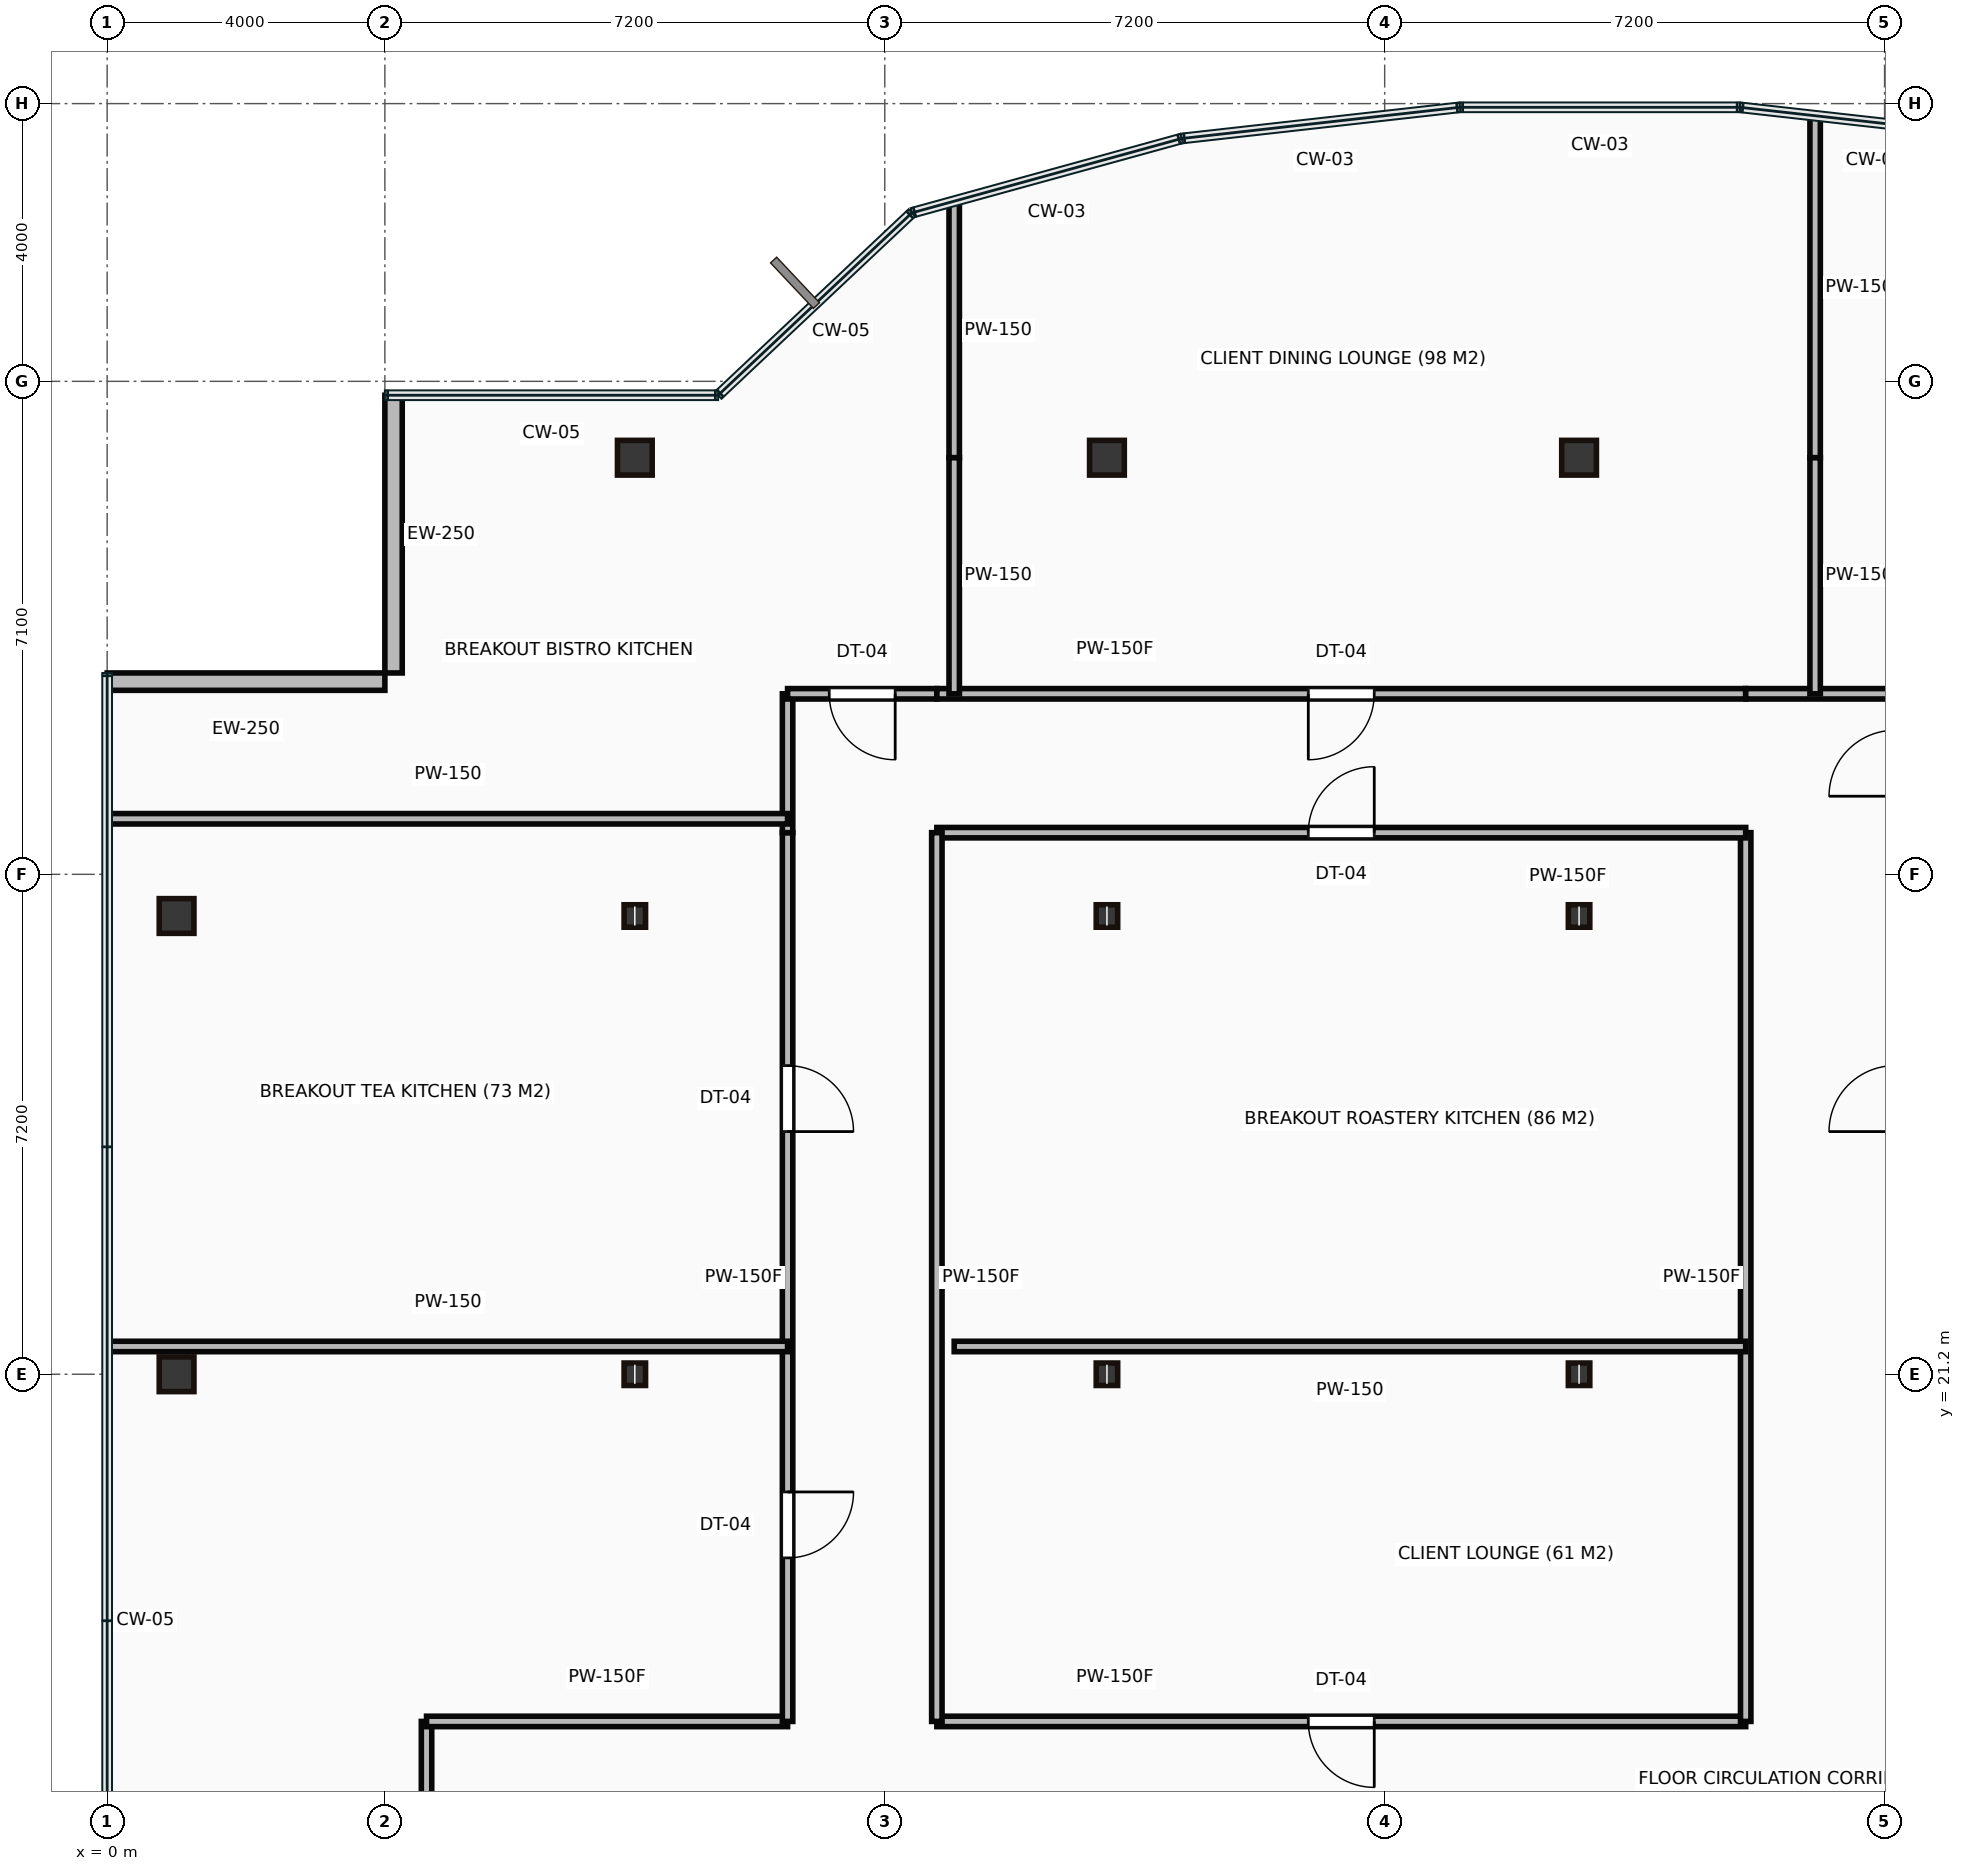
"""IFC4 building model, lengths in metres.
Left out: names, types, materials, properties, quantities, classifications, styles, units other than length and angle.
Written with IfcOpenShell. Run it as: python <this file> out.ifc"""

import sys

from ifc_helpers import new_model, si_unit, direction, frame, frame_2d, origin, origin_2d, place, context, subcontext, project, spatial, rectangle, hollow_rectangle, i_section, extrude, source, transform, mapped, element, fill, save


model = new_model("IFC4")
c1 = context("Model", 3, precision=1e-05, world=origin(), true_north=direction((0.0, 1.0)))
c2 = subcontext(c1, "Body", "Model", "MODEL_VIEW")
j1 = project(units=[si_unit("LENGTHUNIT", "METRE"), si_unit("PLANEANGLEUNIT", "RADIAN")], contexts=[c1])
p1 = place(None, origin())
s1 = spatial("IfcSite", under=j1, at=p1, CompositionType="ELEMENT")
p2 = place(p1, origin())
s2 = spatial("IfcBuilding", under=s1, at=p2, CompositionType="ELEMENT")
p3 = place(p2, frame((0.0, 0.0, 255.15)))
s3 = spatial("IfcBuildingStorey", under=s2, at=p3, CompositionType="ELEMENT", Elevation=255.15)
m1 = source(origin(), c2, "Body", "SweptSolid", [
    extrude(hollow_rectangle(XDim=0.5, YDim=0.5, WallThickness=0.022, at=origin_2d()), origin(), (0.0, 0.0, 1.0), 3.65),
])
for number, where, z_axis, x_axis in (
    (1, (1.0, 21.2, 0.0), (0.0, 0.0, 1.0), (1.0, 0.0, 0.0)),
    (2, (1.0, 27.8, 0.0), (0.0, 0.0, 1.0), (1.0, 0.0, 0.0)),
):
    element("IfcColumn", number, at=place(p3, frame(where, z_axis=z_axis, x_axis=x_axis)), inside=s3, PredefinedType="COLUMN", context=c2, shape_type="MappedRepresentation", body=[
        mapped(m1, transform((0.0, 0.0, 0.0))),
    ])
m2 = source(origin(), c2, "Body", "SweptSolid", [
    extrude(i_section(OverallWidth=0.309, OverallDepth=0.323, WebThickness=0.014, FlangeThickness=0.023, at=origin_2d()), origin(), (0.0, 0.0, 1.0), 3.65),
])
for number, where, z_axis, x_axis in (
    (3, (7.6, 21.2, 0.0), (0.0, 0.0, 1.0), (1.0, 0.0, 0.0)),
    (4, (7.6, 27.8, 0.0), (0.0, 0.0, 1.0), (1.0, 0.0, 0.0)),
):
    element("IfcColumn", number, at=place(p3, frame(where, z_axis=z_axis, x_axis=x_axis)), inside=s3, PredefinedType="COLUMN", context=c2, shape_type="MappedRepresentation", body=[
        mapped(m2, transform((0.0, 0.0, 0.0))),
    ])
p4 = place(p3, frame((7.6, 34.4, 0.0), z_axis=(0.0, 0.0, 1.0), x_axis=(1.0, 0.0, 0.0)))
e5 = element("IfcColumn", 5, at=p4, inside=s3, PredefinedType="COLUMN", context=c2, shape_type="MappedRepresentation", body=[
    mapped(m1, transform((0.0, 0.0, 0.0))),
])
for number, where, z_axis, x_axis in (
    (6, (14.4, 21.2, 0.0), (0.0, 0.0, 1.0), (1.0, 0.0, 0.0)),
    (7, (14.4, 27.8, 0.0), (0.0, 0.0, 1.0), (1.0, 0.0, 0.0)),
):
    element("IfcColumn", number, at=place(p3, frame(where, z_axis=z_axis, x_axis=x_axis)), inside=s3, PredefinedType="COLUMN", context=c2, shape_type="MappedRepresentation", body=[
        mapped(m2, transform((0.0, 0.0, 0.0))),
    ])
p5 = place(p3, frame((14.4, 34.4, 0.0), z_axis=(0.0, 0.0, 1.0), x_axis=(1.0, 0.0, 0.0)))
e8 = element("IfcColumn", 8, at=p5, inside=s3, PredefinedType="COLUMN", context=c2, shape_type="MappedRepresentation", body=[
    mapped(m1, transform((0.0, 0.0, 0.0))),
])
for number, where, z_axis, x_axis in (
    (9, (21.2, 21.2, 0.0), (0.0, 0.0, 1.0), (1.0, 0.0, 0.0)),
    (10, (21.2, 27.8, 0.0), (0.0, 0.0, 1.0), (1.0, 0.0, 0.0)),
):
    element("IfcColumn", number, at=place(p3, frame(where, z_axis=z_axis, x_axis=x_axis)), inside=s3, PredefinedType="COLUMN", context=c2, shape_type="MappedRepresentation", body=[
        mapped(m2, transform((0.0, 0.0, 0.0))),
    ])
p6 = place(p3, frame((21.2, 34.4, 0.0), z_axis=(0.0, 0.0, 1.0), x_axis=(1.0, 0.0, 0.0)))
e11 = element("IfcColumn", 11, at=p6, inside=s3, PredefinedType="COLUMN", context=c2, shape_type="MappedRepresentation", body=[
    mapped(m1, transform((0.0, 0.0, 0.0))),
])
m3 = source(origin(), c2, "Body", "SweptSolid", [
    extrude(rectangle(XDim=4.0, YDim=0.25, at=frame_2d((2.0, 0.0))), origin(), (0.0, 0.0, 1.0), 3.4),
])
for number, where, z_axis, x_axis in (
    (12, (4.125, 35.3, 0.0), (0.0, 0.0, 1.0), (0.0, -1.0, 0.0)),
    (13, (4.0, 31.175, 0.0), (0.0, 0.0, 1.0), (-1.0, 0.0, 0.0)),
):
    element("IfcWall", number, at=place(p3, frame(where, z_axis=z_axis, x_axis=x_axis)), inside=s3, PredefinedType="STANDARD", context=c2, shape_type="MappedRepresentation", body=[
        mapped(m3, transform((0.0, 0.0, 0.0))),
    ])
m4 = source(origin(), c2, "Body", "SweptSolid", [
    extrude(rectangle(XDim=2.12, YDim=0.15, at=frame_2d((1.06, 0.0))), origin(), (0.0, 0.0, 1.0), 3.4),
])
p7 = place(p3, frame((4.6, 14.08, 0.0), z_axis=(0.0, 0.0, 1.0), x_axis=(0.0, 1.0, 0.0)))
e14 = element("IfcWall", 14, at=p7, inside=s3, PredefinedType="PARTITIONING", context=c2, shape_type="MappedRepresentation", body=[
    mapped(m4, transform((0.0, 0.0, 0.0))),
])
m5 = source(origin(), c2, "Body", "SweptSolid", [
    extrude(rectangle(XDim=5.2, YDim=0.15, at=frame_2d((2.6, 0.0))), origin(), (0.0, 0.0, 1.0), 3.4),
])
p8 = place(p3, frame((4.6, 16.2, 0.0), z_axis=(0.0, 0.0, 1.0), x_axis=(1.0, 0.0, 0.0)))
e15 = element("IfcWall", 15, at=p8, inside=s3, PredefinedType="PARTITIONING", context=c2, shape_type="MappedRepresentation", body=[
    mapped(m5, transform((0.0, 0.0, 0.0))),
])
m6 = source(origin(), c2, "Body", "SweptSolid", [
    extrude(rectangle(XDim=12.8, YDim=0.15, at=frame_2d((6.4, 0.0))), origin(), (0.0, 0.0, 1.0), 3.4),
])
p9 = place(p3, frame((9.8, 16.2, 0.0), z_axis=(0.0, 0.0, 1.0), x_axis=(0.0, 1.0, 0.0)))
e16 = element("IfcWall", 16, at=p9, inside=s3, PredefinedType="PARTITIONING", context=c2, shape_type="MappedRepresentation", body=[
    mapped(m6, transform((0.0, 0.0, 0.0))),
])
p10 = place(p9, frame((2.355, 0.0, 0.0)))
e17 = element("IfcOpeningElement", 17, at=p10, cuts=e16, PredefinedType="OPENING", context=c2, shape_type="SweptSolid", body=[
    extrude(rectangle(XDim=0.95, YDim=2.15, at=frame_2d((0.475, 1.075))), frame((0.0, 0.085, 0.0), z_axis=(0.0, -1.0, 0.0), x_axis=(1.0, 0.0, 0.0)), (0.0, 0.0, 1.0), 0.17),
])
p11 = place(p9, frame((8.495, 0.0, 0.0)))
e18 = element("IfcOpeningElement", 18, at=p11, cuts=e16, PredefinedType="OPENING", context=c2, shape_type="SweptSolid", body=[
    extrude(rectangle(XDim=0.95, YDim=2.15, at=frame_2d((0.475, 1.075))), frame((0.0, 0.085, 0.0), z_axis=(0.0, -1.0, 0.0), x_axis=(1.0, 0.0, 0.0)), (0.0, 0.0, 1.0), 0.17),
])
m7 = source(origin(), c2, "Body", "SweptSolid", [
    extrude(rectangle(XDim=2.0, YDim=0.15, at=frame_2d((1.0, 0.0))), origin(), (0.0, 0.0, 1.0), 3.4),
])
p12 = place(p3, frame((9.8, 29.0, 0.0), z_axis=(0.0, 0.0, 1.0), x_axis=(0.0, 1.0, 0.0)))
e19 = element("IfcWall", 19, at=p12, inside=s3, PredefinedType="PARTITIONING", context=c2, shape_type="MappedRepresentation", body=[
    mapped(m7, transform((0.0, 0.0, 0.0))),
])
m8 = source(origin(), c2, "Body", "SweptSolid", [
    extrude(rectangle(XDim=2.15, YDim=0.15, at=frame_2d((1.075, 0.0))), origin(), (0.0, 0.0, 1.0), 3.4),
])
p13 = place(p3, frame((9.8, 31.0, 0.0), z_axis=(0.0, 0.0, 1.0), x_axis=(1.0, 0.0, 0.0)))
e20 = element("IfcWall", 20, at=p13, inside=s3, PredefinedType="PARTITIONING", context=c2, shape_type="MappedRepresentation", body=[
    mapped(m8, transform((0.0, 0.0, 0.0))),
])
p14 = place(p13, frame((0.6, 0.0, 0.0)))
e21 = element("IfcOpeningElement", 21, at=p14, cuts=e20, PredefinedType="OPENING", context=c2, shape_type="SweptSolid", body=[
    extrude(rectangle(XDim=0.95, YDim=2.15, at=frame_2d((0.475, 1.075))), frame((0.0, 0.085, 0.0), z_axis=(0.0, -1.0, 0.0), x_axis=(1.0, 0.0, 0.0)), (0.0, 0.0, 1.0), 0.17),
])
m9 = source(origin(), c2, "Body", "SweptSolid", [
    extrude(rectangle(XDim=11.65, YDim=0.15, at=frame_2d((5.825, 0.0))), origin(), (0.0, 0.0, 1.0), 3.4),
])
p15 = place(p3, frame((11.95, 31.0, 0.0), z_axis=(0.0, 0.0, 1.0), x_axis=(1.0, 0.0, 0.0)))
e22 = element("IfcWall", 22, at=p15, inside=s3, PredefinedType="PARTITIONING", context=c2, shape_type="MappedRepresentation", body=[
    mapped(m9, transform((0.0, 0.0, 0.0))),
])
p16 = place(p15, frame((5.35, 0.0, 0.0)))
e23 = element("IfcOpeningElement", 23, at=p16, cuts=e22, PredefinedType="OPENING", context=c2, shape_type="SweptSolid", body=[
    extrude(rectangle(XDim=0.95, YDim=2.15, at=frame_2d((0.475, 1.075))), frame((0.0, 0.085, 0.0), z_axis=(0.0, -1.0, 0.0), x_axis=(1.0, 0.0, 0.0)), (0.0, 0.0, 1.0), 0.17),
])
p17 = place(p3, frame((23.6, 31.0, 0.0), z_axis=(0.0, 0.0, 1.0), x_axis=(1.0, 0.0, 0.0)))
e24 = element("IfcWall", 24, at=p17, inside=s3, PredefinedType="PARTITIONING", context=c2, shape_type="MappedRepresentation", body=[
    mapped(m8, transform((0.0, 0.0, 0.0))),
])
p18 = place(p3, frame((11.95, 16.2, 0.0), z_axis=(0.0, 0.0, 1.0), x_axis=(1.0, 0.0, 0.0)))
e25 = element("IfcWall", 25, at=p18, inside=s3, PredefinedType="PARTITIONING", context=c2, shape_type="MappedRepresentation", body=[
    mapped(m9, transform((0.0, 0.0, 0.0))),
])
p19 = place(p18, frame((5.35, 0.0, 0.0)))
e26 = element("IfcOpeningElement", 26, at=p19, cuts=e25, PredefinedType="OPENING", context=c2, shape_type="SweptSolid", body=[
    extrude(rectangle(XDim=0.95, YDim=2.15, at=frame_2d((0.475, 1.075))), frame((0.0, 0.085, 0.0), z_axis=(0.0, -1.0, 0.0), x_axis=(1.0, 0.0, 0.0)), (0.0, 0.0, 1.0), 0.17),
])
p20 = place(p3, frame((23.6, 16.2, 0.0), z_axis=(0.0, 0.0, 1.0), x_axis=(0.0, 1.0, 0.0)))
e27 = element("IfcWall", 27, at=p20, inside=s3, PredefinedType="PARTITIONING", context=c2, shape_type="MappedRepresentation", body=[
    mapped(m6, transform((0.0, 0.0, 0.0))),
])
p21 = place(p3, frame((23.6, 29.0, 0.0), z_axis=(0.0, 0.0, 1.0), x_axis=(-1.0, 0.0, 0.0)))
e28 = element("IfcWall", 28, at=p21, inside=s3, PredefinedType="PARTITIONING", context=c2, shape_type="MappedRepresentation", body=[
    mapped(m9, transform((0.0, 0.0, 0.0))),
])
p22 = place(p21, frame((5.35, 0.0, 0.0)))
e29 = element("IfcOpeningElement", 29, at=p22, cuts=e28, PredefinedType="OPENING", context=c2, shape_type="SweptSolid", body=[
    extrude(rectangle(XDim=0.95, YDim=2.15, at=frame_2d((0.475, 1.075))), frame((0.0, 0.085, 0.0), z_axis=(0.0, -1.0, 0.0), x_axis=(1.0, 0.0, 0.0)), (0.0, 0.0, 1.0), 0.17),
])
p23 = place(p3, frame((11.95, 29.0, 0.0), z_axis=(0.0, 0.0, 1.0), x_axis=(0.0, -1.0, 0.0)))
e30 = element("IfcWall", 30, at=p23, inside=s3, PredefinedType="PARTITIONING", context=c2, shape_type="MappedRepresentation", body=[
    mapped(m6, transform((0.0, 0.0, 0.0))),
])
m10 = source(origin(), c2, "Body", "SweptSolid", [
    extrude(rectangle(XDim=9.78, YDim=0.15, at=frame_2d((4.89, 0.0))), origin(), (0.0, 0.0, 1.0), 3.4),
])
for number, where, z_axis, x_axis in (
    (31, (0.02, 21.6, 0.0), (0.0, 0.0, 1.0), (1.0, 0.0, 0.0)),
    (32, (0.02, 29.2, 0.0), (0.0, 0.0, 1.0), (1.0, 0.0, 0.0)),
):
    element("IfcWall", number, at=place(p3, frame(where, z_axis=z_axis, x_axis=x_axis)), inside=s3, PredefinedType="PARTITIONING", context=c2, shape_type="MappedRepresentation", body=[
        mapped(m10, transform((0.0, 0.0, 0.0))),
    ])
m11 = source(origin(), c2, "Body", "SweptSolid", [
    extrude(rectangle(XDim=11.4, YDim=0.15, at=frame_2d((5.7, 0.0))), origin(), (0.0, 0.0, 1.0), 3.4),
])
p24 = place(p3, frame((23.6, 21.6, 0.0), z_axis=(0.0, 0.0, 1.0), x_axis=(-1.0, 0.0, 0.0)))
e33 = element("IfcWall", 33, at=p24, inside=s3, PredefinedType="PARTITIONING", context=c2, shape_type="MappedRepresentation", body=[
    mapped(m11, transform((0.0, 0.0, 0.0))),
])
m12 = source(origin(), c2, "Body", "SweptSolid", [
    extrude(rectangle(XDim=3.674, YDim=0.15, at=frame_2d((1.837, 0.0))), origin(), (0.0, 0.0, 1.0), 3.4),
])
p25 = place(p3, frame((12.2, 38.074, 0.0), z_axis=(0.0, 0.0, 1.0), x_axis=(0.0, -1.0, 0.0)))
e34 = element("IfcWall", 34, at=p25, inside=s3, PredefinedType="PARTITIONING", context=c2, shape_type="MappedRepresentation", body=[
    mapped(m12, transform((0.0, 0.0, 0.0))),
])
m13 = source(origin(), c2, "Body", "SweptSolid", [
    extrude(rectangle(XDim=3.4, YDim=0.15, at=frame_2d((1.7, 0.0))), origin(), (0.0, 0.0, 1.0), 3.4),
])
p26 = place(p3, frame((12.2, 34.4, 0.0), z_axis=(0.0, 0.0, 1.0), x_axis=(0.0, -1.0, 0.0)))
e35 = element("IfcWall", 35, at=p26, inside=s3, PredefinedType="PARTITIONING", context=c2, shape_type="MappedRepresentation", body=[
    mapped(m13, transform((0.0, 0.0, 0.0))),
])
m14 = source(origin(), c2, "Body", "SweptSolid", [
    extrude(rectangle(XDim=4.905, YDim=0.15, at=frame_2d((2.453, 0.0))), origin(), (0.0, 0.0, 1.0), 3.4),
])
p27 = place(p3, frame((24.6, 39.305, 0.0), z_axis=(0.0, 0.0, 1.0), x_axis=(0.0, -1.0, 0.0)))
e36 = element("IfcWall", 36, at=p27, inside=s3, PredefinedType="PARTITIONING", context=c2, shape_type="MappedRepresentation", body=[
    mapped(m14, transform((0.0, 0.0, 0.0))),
])
p28 = place(p3, frame((24.6, 34.4, 0.0), z_axis=(0.0, 0.0, 1.0), x_axis=(0.0, -1.0, 0.0)))
e37 = element("IfcWall", 37, at=p28, inside=s3, PredefinedType="PARTITIONING", context=c2, shape_type="MappedRepresentation", body=[
    mapped(m13, transform((0.0, 0.0, 0.0))),
])
m15 = source(origin(), c2, "Body", "SweptSolid", [
    extrude(rectangle(XDim=0.95, YDim=2.15, at=frame_2d((0.475, 1.075))), frame((0.0, 0.025, 0.0), z_axis=(0.0, -1.0, 0.0), x_axis=(1.0, 0.0, 0.0)), (0.0, 0.0, 1.0), 0.05),
])
p29 = place(p10, origin())
e38 = element("IfcDoor", 38, at=p29, inside=s3, OperationType="SINGLE_SWING_RIGHT", PredefinedType="DOOR", context=c2, shape_type="MappedRepresentation", body=[
    mapped(m15, transform((0.0, 0.0, 0.0))),
])
fill(e17, e38)
p30 = place(p11, origin())
e39 = element("IfcDoor", 39, at=p30, inside=s3, OperationType="SINGLE_SWING_LEFT", PredefinedType="DOOR", context=c2, shape_type="MappedRepresentation", body=[
    mapped(m15, transform((0.0, 0.0, 0.0))),
])
fill(e18, e39)
p31 = place(p14, origin())
e40 = element("IfcDoor", 40, at=p31, inside=s3, OperationType="SINGLE_SWING_RIGHT", PredefinedType="DOOR", context=c2, shape_type="MappedRepresentation", body=[
    mapped(m15, transform((0.0, 0.0, 0.0))),
])
fill(e21, e40)
p32 = place(p22, origin())
e41 = element("IfcDoor", 41, at=p32, inside=s3, OperationType="SINGLE_SWING_LEFT", PredefinedType="DOOR", context=c2, shape_type="MappedRepresentation", body=[
    mapped(m15, transform((0.0, 0.0, 0.0))),
])
fill(e29, e41)
p33 = place(p19, origin())
e42 = element("IfcDoor", 42, at=p33, inside=s3, OperationType="SINGLE_SWING_RIGHT", PredefinedType="DOOR", context=c2, shape_type="MappedRepresentation", body=[
    mapped(m15, transform((0.0, 0.0, 0.0))),
])
fill(e26, e42)
p34 = place(p16, origin())
e43 = element("IfcDoor", 43, at=p34, inside=s3, OperationType="SINGLE_SWING_LEFT", PredefinedType="DOOR", context=c2, shape_type="MappedRepresentation", body=[
    mapped(m15, transform((0.0, 0.0, 0.0))),
])
fill(e23, e43)
save(model, sys.argv[1])
